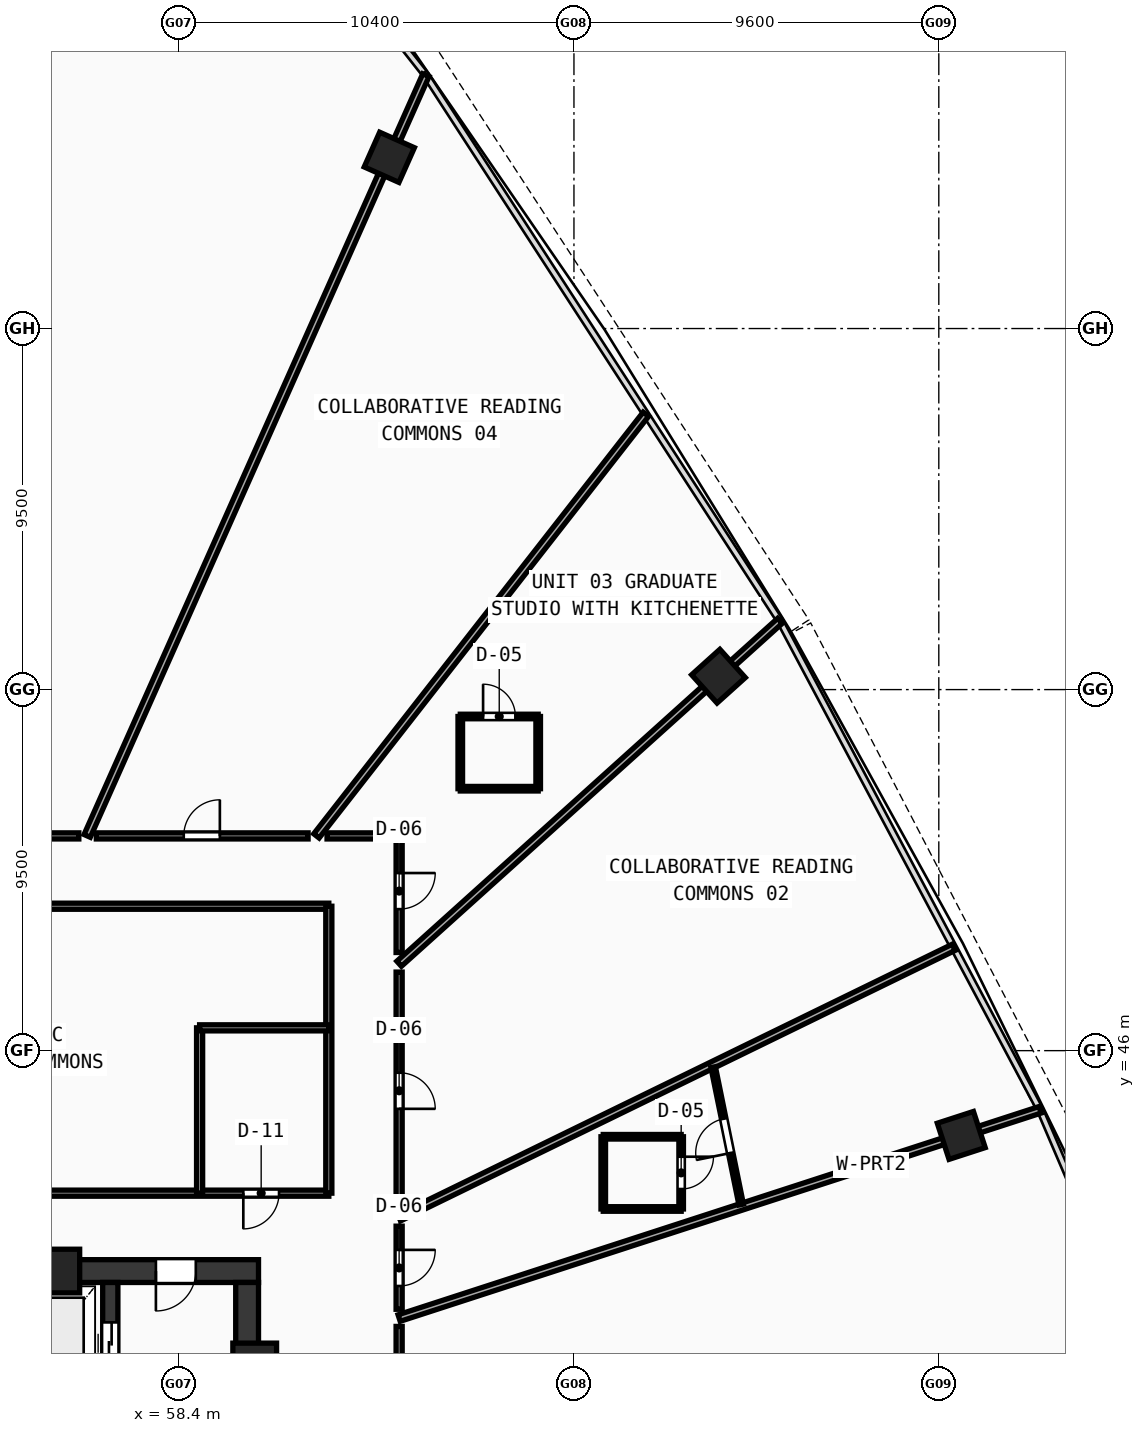
"""IFC4 building model, lengths in metres.
Left out: names, types, materials, properties, quantities, classifications, styles, units other than length and angle.
Written with IfcOpenShell. Run it as: python <this file> out.ifc"""

import sys

from ifc_helpers import new_model, si_unit, direction, frame, frame_2d, origin, origin_with_axes, origin_2d, place, context, subcontext, project, spatial, rectangle, hollow_rectangle, extrude, source, transform, mapped, element, fill, save


model = new_model("IFC4")
c1 = context("Model", 3, precision=1e-05, world=origin(), true_north=direction((0.0, 1.0)))
c2 = subcontext(c1, "Body", "Model", "MODEL_VIEW")
j1 = project(units=[si_unit("LENGTHUNIT", "METRE"), si_unit("PLANEANGLEUNIT", "RADIAN")], contexts=[c1])
p1 = place(None, origin())
s1 = spatial("IfcSite", under=j1, at=p1, CompositionType="ELEMENT")
p2 = place(p1, origin())
s2 = spatial("IfcBuilding", under=s1, at=p2, CompositionType="ELEMENT")
p3 = place(p2, frame((0.0, 0.0, 88.78)))
s3 = spatial("IfcBuildingStorey", under=s2, at=p3, CompositionType="ELEMENT", Elevation=88.78)
p4 = place(p3, frame((49.2, 40.2, 0.0), z_axis=(0.0, 0.0, 1.0), x_axis=(1.0, 0.0, 0.0)))
e1 = element("IfcWall", 1, at=p4, inside=s3, PredefinedType="SHEAR", context=c2, shape_type="SweptSolid", body=[
    extrude(rectangle(XDim=11.3, YDim=0.6, at=frame_2d((5.65, 0.0))), origin(), (0.0, 0.0, 1.0), 3.54),
])
p5 = place(p4, frame((8.6, 0.0, 0.0)))
e2 = element("IfcOpeningElement", 2, at=p5, cuts=e1, PredefinedType="OPENING", context=c2, shape_type="SweptSolid", body=[
    extrude(rectangle(XDim=1.05, YDim=2.1, at=frame_2d((0.525, 1.05))), frame((0.0, 0.31, 0.0), z_axis=(0.0, -1.0, 0.0), x_axis=(1.0, 0.0, 0.0)), (0.0, 0.0, 1.0), 0.62),
])
p6 = place(p3, frame((60.2, 27.8, 0.0), z_axis=(0.0, 0.0, 1.0), x_axis=(0.0, 1.0, 0.0)))
e3 = element("IfcWall", 3, at=p6, inside=s3, PredefinedType="SHEAR", context=c2, shape_type="SweptSolid", body=[
    extrude(rectangle(XDim=12.1, YDim=0.6, at=frame_2d((6.05, 0.0))), origin(), (0.0, 0.0, 1.0), 3.54),
])
p7 = place(p3, frame((56.6, 27.8, 0.0), z_axis=(0.0, 0.0, 1.0), x_axis=(0.0, 1.0, 0.0)))
e4 = element("IfcWall", 4, at=p7, inside=s3, PredefinedType="SHEAR", context=c2, shape_type="SweptSolid", body=[
    extrude(rectangle(XDim=12.1, YDim=0.4, at=frame_2d((6.05, 0.0))), origin(), (0.0, 0.0, 1.0), 3.54),
])
p8 = place(p7, frame((9.95, 0.0, 0.0)))
e5 = element("IfcOpeningElement", 5, at=p8, cuts=e4, PredefinedType="OPENING", context=c2, shape_type="SweptSolid", body=[
    extrude(rectangle(XDim=1.1, YDim=2.1, at=frame_2d((0.55, 1.05))), frame((0.0, 0.21, 0.0), z_axis=(0.0, -1.0, 0.0), x_axis=(1.0, 0.0, 0.0)), (0.0, 0.0, 1.0), 0.42),
])
m1 = source(origin(), c2, "Body", "SweptSolid", [
    extrude(hollow_rectangle(XDim=1.15, YDim=1.15, WallThickness=0.048, at=origin_2d()), origin(), (0.0, 0.0, 1.0), 3.8),
])
for number, where, z_axis, x_axis in (
    (6, (60.4, 37.729, -0.26), (0.0, 0.0, 1.0), (1.0, 0.0, 0.0)),
    (7, (55.219, 40.2, -0.26), (0.0, 0.0, 1.0), (1.0, 0.0, 0.0)),
):
    element("IfcColumn", number, at=place(p3, frame(where, z_axis=z_axis, x_axis=x_axis)), inside=s3, PredefinedType="COLUMN", context=c2, shape_type="MappedRepresentation", body=[
        mapped(m1, transform((0.0, 0.0, 0.0), scale=1.0)),
    ])
m2 = source(origin(), c2, "Body", "SweptSolid", [
    extrude(hollow_rectangle(XDim=1.0, YDim=1.0, WallThickness=0.042, at=origin_2d()), origin(), (0.0, 0.0, 1.0), 3.8),
])
for number, where, z_axis, x_axis in (
    (8, (78.991, 43.77, -0.26), (0.0, 0.0, 1.0), (-0.309, 0.951, 0.0)),
    (9, (72.603, 55.852, -0.26), (0.0, 0.0, 1.0), (-0.669, 0.743, 0.0)),
    (10, (63.941, 69.505, -0.26), (0.0, 0.0, 1.0), (-0.914, 0.407, 0.0)),
):
    element("IfcColumn", number, at=place(p3, frame(where, z_axis=z_axis, x_axis=x_axis)), inside=s3, PredefinedType="COLUMN", context=c2, shape_type="MappedRepresentation", body=[
        mapped(m2, transform((0.0, 0.0, 0.0), scale=1.0)),
    ])
p9 = place(p3, frame((45.92, 42.25, 0.0), z_axis=(0.0, 0.0, 1.0), x_axis=(1.0, 0.0, 0.0)))
e11 = element("IfcWall", 11, at=p9, inside=s3, PredefinedType="PARTITIONING", context=c2, shape_type="SweptSolid", body=[
    extrude(rectangle(XDim=16.43, YDim=0.16, at=frame_2d((8.215, 0.0))), origin(), (0.0, 0.0, 1.0), 2.84),
])
p10 = place(p9, frame((2.1, 0.0, 0.0)))
e12 = element("IfcOpeningElement", 12, at=p10, cuts=e11, PredefinedType="OPENING", context=c2, shape_type="SweptSolid", body=[
    extrude(rectangle(XDim=0.92, YDim=2.1, at=frame_2d((0.46, 1.05))), frame((0.0, 0.09, 0.0), z_axis=(0.0, -1.0, 0.0), x_axis=(1.0, 0.0, 0.0)), (0.0, 0.0, 1.0), 0.18),
])
p11 = place(p9, frame((14.18, 0.0, 0.0)))
e13 = element("IfcOpeningElement", 13, at=p11, cuts=e11, PredefinedType="OPENING", context=c2, shape_type="SweptSolid", body=[
    extrude(rectangle(XDim=0.94, YDim=2.1, at=frame_2d((0.47, 1.05))), frame((0.0, 0.09, 0.0), z_axis=(0.0, -1.0, 0.0), x_axis=(1.0, 0.0, 0.0)), (0.0, 0.0, 1.0), 0.18),
])
p12 = place(p3, frame((45.92, 49.8, 0.0), z_axis=(0.0, 0.0, 1.0), x_axis=(1.0, 0.0, 0.0)))
e14 = element("IfcWall", 14, at=p12, inside=s3, PredefinedType="PARTITIONING", context=c2, shape_type="SweptSolid", body=[
    extrude(rectangle(XDim=16.43, YDim=0.16, at=frame_2d((8.215, 0.0))), origin(), (0.0, 0.0, 1.0), 2.84),
])
p13 = place(p3, frame((62.35, 42.25, 0.0), z_axis=(0.0, 0.0, 1.0), x_axis=(0.0, 1.0, 0.0)))
e15 = element("IfcWall", 15, at=p13, inside=s3, PredefinedType="PARTITIONING", context=c2, shape_type="SweptSolid", body=[
    extrude(rectangle(XDim=7.55, YDim=0.16, at=frame_2d((3.775, 0.0))), origin(), (0.0, 0.0, 1.0), 2.84),
])
p14 = place(p3, frame((58.95, 42.25, 0.0), z_axis=(0.0, 0.0, 1.0), x_axis=(0.0, 1.0, 0.0)))
e16 = element("IfcWall", 16, at=p14, inside=s3, PredefinedType="PARTITIONING", context=c2, shape_type="SweptSolid", body=[
    extrude(rectangle(XDim=4.35, YDim=0.16, at=frame_2d((2.175, 0.0))), origin(), (0.0, 0.0, 1.0), 2.84),
])
p15 = place(p3, frame((58.95, 46.6, 0.0), z_axis=(0.0, 0.0, 1.0), x_axis=(1.0, 0.0, 0.0)))
e17 = element("IfcWall", 17, at=p15, inside=s3, PredefinedType="PARTITIONING", context=c2, shape_type="SweptSolid", body=[
    extrude(rectangle(XDim=3.4, YDim=0.16, at=frame_2d((1.7, 0.0))), origin(), (0.0, 0.0, 1.0), 2.84),
])
p16 = place(p3, frame((64.2, 38.964, 0.0), z_axis=(0.0, 0.0, 1.0), x_axis=(0.951054301474, 0.309023810812, 0.0)))
e18 = element("IfcWall", 18, at=p16, inside=s3, PredefinedType="PARTITIONING", context=c2, shape_type="SweptSolid", body=[
    extrude(rectangle(XDim=17.733, YDim=0.18, at=frame_2d((8.867, 0.0))), origin(), (0.0, 0.0, 1.0), 2.84),
])
p17 = place(p3, frame((64.2, 41.601, 0.0), z_axis=(0.0, 0.0, 1.0), x_axis=(0.898796049991, 0.438367038588, 0.0)))
e19 = element("IfcWall", 19, at=p17, inside=s3, PredefinedType="PARTITIONING", context=c2, shape_type="SweptSolid", body=[
    extrude(rectangle(XDim=16.234, YDim=0.18, at=frame_2d((8.117, 0.0))), origin(), (0.0, 0.0, 1.0), 2.84),
])
p18 = place(p3, frame((64.2, 48.287, 0.0), z_axis=(0.0, 0.0, 1.0), x_axis=(0.743149168899, 0.669125782469, 0.0)))
e20 = element("IfcWall", 20, at=p18, inside=s3, PredefinedType="PARTITIONING", context=c2, shape_type="SweptSolid", body=[
    extrude(rectangle(XDim=13.483, YDim=0.18, at=frame_2d((6.741, 0.0))), origin(), (0.0, 0.0, 1.0), 2.84),
])
p19 = place(p3, frame((62.024, 51.65, 0.0), z_axis=(0.0, 0.0, 1.0), x_axis=(0.615647406864, 0.788021744891, 0.0)))
e21 = element("IfcWall", 21, at=p19, inside=s3, PredefinedType="PARTITIONING", context=c2, shape_type="SweptSolid", body=[
    extrude(rectangle(XDim=14.08, YDim=0.18, at=frame_2d((7.04, 0.0))), origin(), (0.0, 0.0, 1.0), 2.84),
])
p20 = place(p3, frame((55.992, 51.65, 0.0), z_axis=(0.0, 0.0, 1.0), x_axis=(0.406733854264, 0.913546699296, 0.0)))
e22 = element("IfcWall", 22, at=p20, inside=s3, PredefinedType="PARTITIONING", context=c2, shape_type="SweptSolid", body=[
    extrude(rectangle(XDim=21.911, YDim=0.18, at=frame_2d((10.956, 0.0))), origin(), (0.0, 0.0, 1.0), 2.84),
])
p21 = place(p3, frame((45.85, 51.65, 0.0), z_axis=(0.0, 0.0, 1.0), x_axis=(1.0, 0.0, 0.0)))
e23 = element("IfcWall", 23, at=p21, inside=s3, PredefinedType="PARTITIONING", context=c2, shape_type="SweptSolid", body=[
    extrude(rectangle(XDim=9.922, YDim=0.16, at=frame_2d((4.961, 0.0))), origin(), (0.0, 0.0, 1.0), 2.84),
])
p22 = place(p21, frame((4.366, 0.0, 0.0)))
e24 = element("IfcOpeningElement", 24, at=p22, cuts=e23, PredefinedType="OPENING", context=c2, shape_type="SweptSolid", body=[
    extrude(rectangle(XDim=0.95, YDim=2.1, at=frame_2d((0.475, 1.05))), frame((0.0, 0.09, 0.0), z_axis=(0.0, -1.0, 0.0), x_axis=(1.0, 0.0, 0.0)), (0.0, 0.0, 1.0), 0.18),
])
p23 = place(p3, frame((56.233, 51.65, 0.0), z_axis=(0.0, 0.0, 1.0), x_axis=(1.0, 0.0, 0.0)))
e25 = element("IfcWall", 25, at=p23, inside=s3, PredefinedType="PARTITIONING", context=c2, shape_type="SweptSolid", body=[
    extrude(rectangle(XDim=5.572, YDim=0.16, at=frame_2d((2.786, 0.0))), origin(), (0.0, 0.0, 1.0), 3.54),
])
p24 = place(p23, frame((2.3, 0.0, 0.0)))
e26 = element("IfcOpeningElement", 26, at=p24, cuts=e25, PredefinedType="OPENING", context=c2, shape_type="SweptSolid", body=[
    extrude(rectangle(XDim=0.95, YDim=2.1, at=frame_2d((0.475, 1.05))), frame((0.0, 0.09, 0.0), z_axis=(0.0, -1.0, 0.0), x_axis=(1.0, 0.0, 0.0)), (0.0, 0.0, 1.0), 0.18),
])
p25 = place(p3, frame((62.303, 51.65, 0.0), z_axis=(0.0, 0.0, 1.0), x_axis=(1.0, 0.0, 0.0)))
e27 = element("IfcWall", 27, at=p25, inside=s3, PredefinedType="PARTITIONING", context=c2, shape_type="SweptSolid", body=[
    extrude(rectangle(XDim=1.897, YDim=0.16, at=frame_2d((0.948, 0.0))), origin(), (0.0, 0.0, 1.0), 3.54),
])
p26 = place(p3, frame((64.2, 51.65, 0.0), z_axis=(0.0, 0.0, 1.0), x_axis=(0.0, -1.0, 0.0)))
e28 = element("IfcWall", 28, at=p26, inside=s3, PredefinedType="PARTITIONING", context=c2, shape_type="SweptSolid", body=[
    extrude(rectangle(XDim=3.067, YDim=0.16, at=frame_2d((1.534, 0.0))), origin(), (0.0, 0.0, 1.0), 3.54),
])
p27 = place(p26, frame((0.977, 0.0, 0.0)))
e29 = element("IfcOpeningElement", 29, at=p27, cuts=e28, PredefinedType="OPENING", context=c2, shape_type="SweptSolid", body=[
    extrude(rectangle(XDim=0.95, YDim=2.1, at=frame_2d((0.475, 1.05))), frame((0.0, 0.09, 0.0), z_axis=(0.0, -1.0, 0.0), x_axis=(1.0, 0.0, 0.0)), (0.0, 0.0, 1.0), 0.18),
])
p28 = place(p3, frame((64.2, 48.067, 0.0), z_axis=(0.0, 0.0, 1.0), x_axis=(0.0, -1.0, 0.0)))
e30 = element("IfcWall", 30, at=p28, inside=s3, PredefinedType="PARTITIONING", context=c2, shape_type="SweptSolid", body=[
    extrude(rectangle(XDim=6.221, YDim=0.16, at=frame_2d((3.11, 0.0))), origin(), (0.0, 0.0, 1.0), 2.84),
])
p29 = place(p28, frame((2.648, 0.0, 0.0)))
e31 = element("IfcOpeningElement", 31, at=p29, cuts=e30, PredefinedType="OPENING", context=c2, shape_type="SweptSolid", body=[
    extrude(rectangle(XDim=0.95, YDim=2.1, at=frame_2d((0.475, 1.05))), frame((0.0, 0.09, 0.0), z_axis=(0.0, -1.0, 0.0), x_axis=(1.0, 0.0, 0.0)), (0.0, 0.0, 1.0), 0.18),
])
p30 = place(p3, frame((64.2, 41.382, 0.0), z_axis=(0.0, 0.0, 1.0), x_axis=(0.0, -1.0, 0.0)))
e32 = element("IfcWall", 32, at=p30, inside=s3, PredefinedType="PARTITIONING", context=c2, shape_type="SweptSolid", body=[
    extrude(rectangle(XDim=2.187, YDim=0.16, at=frame_2d((1.093, 0.0))), origin(), (0.0, 0.0, 1.0), 3.54),
])
p31 = place(p30, frame((0.624, 0.0, 0.0)))
e33 = element("IfcOpeningElement", 33, at=p31, cuts=e32, PredefinedType="OPENING", context=c2, shape_type="SweptSolid", body=[
    extrude(rectangle(XDim=0.95, YDim=2.1, at=frame_2d((0.475, 1.05))), frame((0.0, 0.09, 0.0), z_axis=(0.0, -1.0, 0.0), x_axis=(1.0, 0.0, 0.0)), (0.0, 0.0, 1.0), 0.18),
])
p32 = place(p3, frame((64.2, 38.744, 0.0), z_axis=(0.0, 0.0, 1.0), x_axis=(0.0, -1.0, 0.0)))
e34 = element("IfcWall", 34, at=p32, inside=s3, PredefinedType="PARTITIONING", context=c2, shape_type="SweptSolid", body=[
    extrude(rectangle(XDim=13.944, YDim=0.16, at=frame_2d((6.972, 0.0))), origin(), (0.0, 0.0, 1.0), 2.84),
])
p33 = place(p32, frame((6.617, 0.0, 0.0)))
e35 = element("IfcOpeningElement", 35, at=p33, cuts=e34, PredefinedType="OPENING", context=c2, shape_type="SweptSolid", body=[
    extrude(rectangle(XDim=0.95, YDim=2.1, at=frame_2d((0.475, 1.05))), frame((0.0, 0.09, 0.0), z_axis=(0.0, -1.0, 0.0), x_axis=(1.0, 0.0, 0.0)), (0.0, 0.0, 1.0), 0.18),
])
p34 = place(p3, frame((69.571, 41.834, 0.0), z_axis=(0.0, 0.0, 1.0), x_axis=(1.0, 0.0, 0.0)))
e36 = element("IfcWall", 36, at=p34, inside=s3, PredefinedType="PARTITIONING", context=c2, shape_type="SweptSolid", body=[
    extrude(rectangle(XDim=2.05, YDim=0.12, at=frame_2d((1.025, 0.0))), origin(), (0.0, 0.0, 1.0), 3.54),
])
p35 = place(p3, frame((71.621, 41.834, 0.0), z_axis=(0.0, 0.0, 1.0), x_axis=(0.0, 1.0, 0.0)))
e37 = element("IfcWall", 37, at=p35, inside=s3, PredefinedType="PARTITIONING", context=c2, shape_type="SweptSolid", body=[
    extrude(rectangle(XDim=1.9, YDim=0.12, at=frame_2d((0.95, 0.0))), origin(), (0.0, 0.0, 1.0), 3.14),
])
p36 = place(p35, frame((0.525, 0.0, 0.0)))
e38 = element("IfcOpeningElement", 38, at=p36, cuts=e37, PredefinedType="OPENING", context=c2, shape_type="SweptSolid", body=[
    extrude(rectangle(XDim=0.85, YDim=2.1, at=frame_2d((0.425, 1.05))), frame((0.0, 0.07, 0.0), z_axis=(0.0, -1.0, 0.0), x_axis=(1.0, 0.0, 0.0)), (0.0, 0.0, 1.0), 0.14),
])
p37 = place(p3, frame((71.621, 43.734, 0.0), z_axis=(0.0, 0.0, 1.0), x_axis=(-1.0, 0.0, 0.0)))
e39 = element("IfcWall", 39, at=p37, inside=s3, PredefinedType="PARTITIONING", context=c2, shape_type="SweptSolid", body=[
    extrude(rectangle(XDim=2.05, YDim=0.12, at=frame_2d((1.025, 0.0))), origin(), (0.0, 0.0, 1.0), 3.54),
])
p38 = place(p3, frame((69.571, 43.734, 0.0), z_axis=(0.0, 0.0, 1.0), x_axis=(0.0, -1.0, 0.0)))
e40 = element("IfcWall", 40, at=p38, inside=s3, PredefinedType="PARTITIONING", context=c2, shape_type="SweptSolid", body=[
    extrude(rectangle(XDim=1.9, YDim=0.12, at=frame_2d((0.95, 0.0))), origin(), (0.0, 0.0, 1.0), 3.54),
])
p39 = place(p3, frame((73.2, 41.951, 0.0), z_axis=(0.0, 0.0, 1.0), x_axis=(-0.199717476268, 0.979853524601, 0.0)))
e41 = element("IfcWall", 41, at=p39, inside=s3, PredefinedType="PARTITIONING", context=c2, shape_type="SweptSolid", body=[
    extrude(rectangle(XDim=3.688, YDim=0.12, at=frame_2d((1.844, 0.0))), origin(), (0.0, 0.0, 1.0), 2.84),
])
p40 = place(p39, frame((1.384, 0.0, 0.0)))
e42 = element("IfcOpeningElement", 42, at=p40, cuts=e41, PredefinedType="OPENING", context=c2, shape_type="SweptSolid", body=[
    extrude(rectangle(XDim=0.92, YDim=2.1, at=frame_2d((0.46, 1.05))), frame((0.0, 0.07, 0.0), z_axis=(0.0, -1.0, 0.0), x_axis=(1.0, 0.0, 0.0)), (0.0, 0.0, 1.0), 0.14),
])
p41 = place(p3, frame((65.809, 52.892, 0.0), z_axis=(0.0, 0.0, 1.0), x_axis=(1.0, 0.0, 0.0)))
e43 = element("IfcWall", 43, at=p41, inside=s3, PredefinedType="PARTITIONING", context=c2, shape_type="SweptSolid", body=[
    extrude(rectangle(XDim=2.05, YDim=0.12, at=frame_2d((1.025, 0.0))), origin(), (0.0, 0.0, 1.0), 3.54),
])
p42 = place(p3, frame((67.859, 52.892, 0.0), z_axis=(0.0, 0.0, 1.0), x_axis=(0.0, 1.0, 0.0)))
e44 = element("IfcWall", 44, at=p42, inside=s3, PredefinedType="PARTITIONING", context=c2, shape_type="SweptSolid", body=[
    extrude(rectangle(XDim=1.9, YDim=0.12, at=frame_2d((0.95, 0.0))), origin(), (0.0, 0.0, 1.0), 3.54),
])
p43 = place(p3, frame((67.859, 54.792, 0.0), z_axis=(0.0, 0.0, 1.0), x_axis=(-1.0, 0.0, 0.0)))
e45 = element("IfcWall", 45, at=p43, inside=s3, PredefinedType="PARTITIONING", context=c2, shape_type="SweptSolid", body=[
    extrude(rectangle(XDim=2.05, YDim=0.12, at=frame_2d((1.025, 0.0))), origin(), (0.0, 0.0, 1.0), 3.54),
])
p44 = place(p43, frame((0.6, 0.0, 0.0)))
e46 = element("IfcOpeningElement", 46, at=p44, cuts=e45, PredefinedType="OPENING", context=c2, shape_type="SweptSolid", body=[
    extrude(rectangle(XDim=0.85, YDim=2.1, at=frame_2d((0.425, 1.05))), frame((0.0, 0.07, 0.0), z_axis=(0.0, -1.0, 0.0), x_axis=(1.0, 0.0, 0.0)), (0.0, 0.0, 1.0), 0.14),
])
p45 = place(p3, frame((65.809, 54.792, 0.0), z_axis=(0.0, 0.0, 1.0), x_axis=(0.0, -1.0, 0.0)))
e47 = element("IfcWall", 47, at=p45, inside=s3, PredefinedType="PARTITIONING", context=c2, shape_type="SweptSolid", body=[
    extrude(rectangle(XDim=1.9, YDim=0.12, at=frame_2d((0.95, 0.0))), origin(), (0.0, 0.0, 1.0), 3.54),
])
m3 = source(origin(), c2, "Body", "SweptSolid", [
    extrude(rectangle(XDim=1.05, YDim=2.1, at=frame_2d((0.525, 1.05))), frame((0.0, 0.025, 0.0), z_axis=(0.0, -1.0, 0.0), x_axis=(1.0, 0.0, 0.0)), (0.0, 0.0, 1.0), 0.05),
])
p46 = place(p5, frame((1.05, 0.0, 0.0), z_axis=(0.0, 0.0, 1.0), x_axis=(-1.0, 0.0, 0.0)))
e48 = element("IfcDoor", 48, at=p46, inside=s3, OperationType="SINGLE_SWING_RIGHT", PredefinedType="DOOR", context=c2, shape_type="MappedRepresentation", body=[
    mapped(m3, transform((0.0, 0.0, 0.0), scale=1.0)),
])
fill(e2, e48)
m4 = source(origin(), c2, "Body", "SweptSolid", [
    extrude(rectangle(XDim=1.1, YDim=2.1, at=frame_2d((0.55, 1.05))), frame((0.0, 0.025, 0.0), z_axis=(0.0, -1.0, 0.0), x_axis=(1.0, 0.0, 0.0)), (0.0, 0.0, 1.0), 0.05),
])
p47 = place(p8, origin_with_axes())
e49 = element("IfcDoor", 49, at=p47, inside=s3, OperationType="DOUBLE_DOOR_SLIDING", PredefinedType="DOOR", context=c2, shape_type="MappedRepresentation", body=[
    mapped(m4, transform((0.0, 0.0, 0.0), scale=1.0)),
])
fill(e5, e49)
m5 = source(origin(), c2, "Body", "SweptSolid", [
    extrude(rectangle(XDim=0.94, YDim=2.1, at=frame_2d((0.47, 1.05))), frame((0.0, 0.025, 0.0), z_axis=(0.0, -1.0, 0.0), x_axis=(1.0, 0.0, 0.0)), (0.0, 0.0, 1.0), 0.05),
])
p48 = place(p11, frame((0.94, 0.0, 0.0), z_axis=(0.0, 0.0, 1.0), x_axis=(-1.0, 0.0, 0.0)))
e50 = element("IfcDoor", 50, at=p48, inside=s3, OperationType="SINGLE_SWING_RIGHT", PredefinedType="DOOR", context=c2, shape_type="MappedRepresentation", body=[
    mapped(m5, transform((0.0, 0.0, 0.0), scale=1.0)),
])
fill(e13, e50)
m6 = source(origin(), c2, "Body", "SweptSolid", [
    extrude(rectangle(XDim=0.95, YDim=2.1, at=frame_2d((0.475, 1.05))), frame((0.0, 0.025, 0.0), z_axis=(0.0, -1.0, 0.0), x_axis=(1.0, 0.0, 0.0)), (0.0, 0.0, 1.0), 0.05),
])
p49 = place(p31, origin_with_axes())
e51 = element("IfcDoor", 51, at=p49, inside=s3, OperationType="SINGLE_SWING_LEFT", PredefinedType="DOOR", context=c2, shape_type="MappedRepresentation", body=[
    mapped(m6, transform((0.0, 0.0, 0.0), scale=1.0)),
])
fill(e33, e51)
m7 = source(origin(), c2, "Body", "SweptSolid", [
    extrude(rectangle(XDim=0.85, YDim=2.1, at=frame_2d((0.425, 1.05))), frame((0.0, 0.025, 0.0), z_axis=(0.0, -1.0, 0.0), x_axis=(1.0, 0.0, 0.0)), (0.0, 0.0, 1.0), 0.05),
])
p50 = place(p36, frame((0.85, 0.0, 0.0), z_axis=(0.0, 0.0, 1.0), x_axis=(-1.0, 0.0, 0.0)))
e52 = element("IfcDoor", 52, at=p50, inside=s3, OperationType="SINGLE_SWING_LEFT", PredefinedType="DOOR", context=c2, shape_type="MappedRepresentation", body=[
    mapped(m7, transform((0.0, 0.0, 0.0), scale=1.0)),
])
fill(e38, e52)
m8 = source(origin(), c2, "Body", "SweptSolid", [
    extrude(rectangle(XDim=0.92, YDim=2.1, at=frame_2d((0.46, 1.05))), frame((0.0, 0.025, 0.0), z_axis=(0.0, -1.0, 0.0), x_axis=(1.0, 0.0, 0.0)), (0.0, 0.0, 1.0), 0.05),
])
p51 = place(p40, origin_with_axes())
e53 = element("IfcDoor", 53, at=p51, inside=s3, OperationType="SINGLE_SWING_LEFT", PredefinedType="DOOR", context=c2, shape_type="MappedRepresentation", body=[
    mapped(m8, transform((0.0, 0.0, 0.0), scale=1.0)),
])
fill(e42, e53)
p52 = place(p29, origin_with_axes())
e54 = element("IfcDoor", 54, at=p52, inside=s3, OperationType="SINGLE_SWING_RIGHT", PredefinedType="DOOR", context=c2, shape_type="MappedRepresentation", body=[
    mapped(m6, transform((0.0, 0.0, 0.0), scale=1.0)),
])
fill(e31, e54)
p53 = place(p27, origin_with_axes())
e55 = element("IfcDoor", 55, at=p53, inside=s3, OperationType="SINGLE_SWING_LEFT", PredefinedType="DOOR", context=c2, shape_type="MappedRepresentation", body=[
    mapped(m6, transform((0.0, 0.0, 0.0), scale=1.0)),
])
fill(e29, e55)
p54 = place(p44, frame((0.85, 0.0, 0.0), z_axis=(0.0, 0.0, 1.0), x_axis=(-1.0, 0.0, 0.0)))
e56 = element("IfcDoor", 56, at=p54, inside=s3, OperationType="SINGLE_SWING_LEFT", PredefinedType="DOOR", context=c2, shape_type="MappedRepresentation", body=[
    mapped(m7, transform((0.0, 0.0, 0.0), scale=1.0)),
])
fill(e46, e56)
p55 = place(p24, origin_with_axes())
e57 = element("IfcDoor", 57, at=p55, inside=s3, OperationType="SINGLE_SWING_RIGHT", PredefinedType="DOOR", context=c2, shape_type="MappedRepresentation", body=[
    mapped(m6, transform((0.0, 0.0, 0.0), scale=1.0)),
])
fill(e26, e57)
save(model, sys.argv[1])
